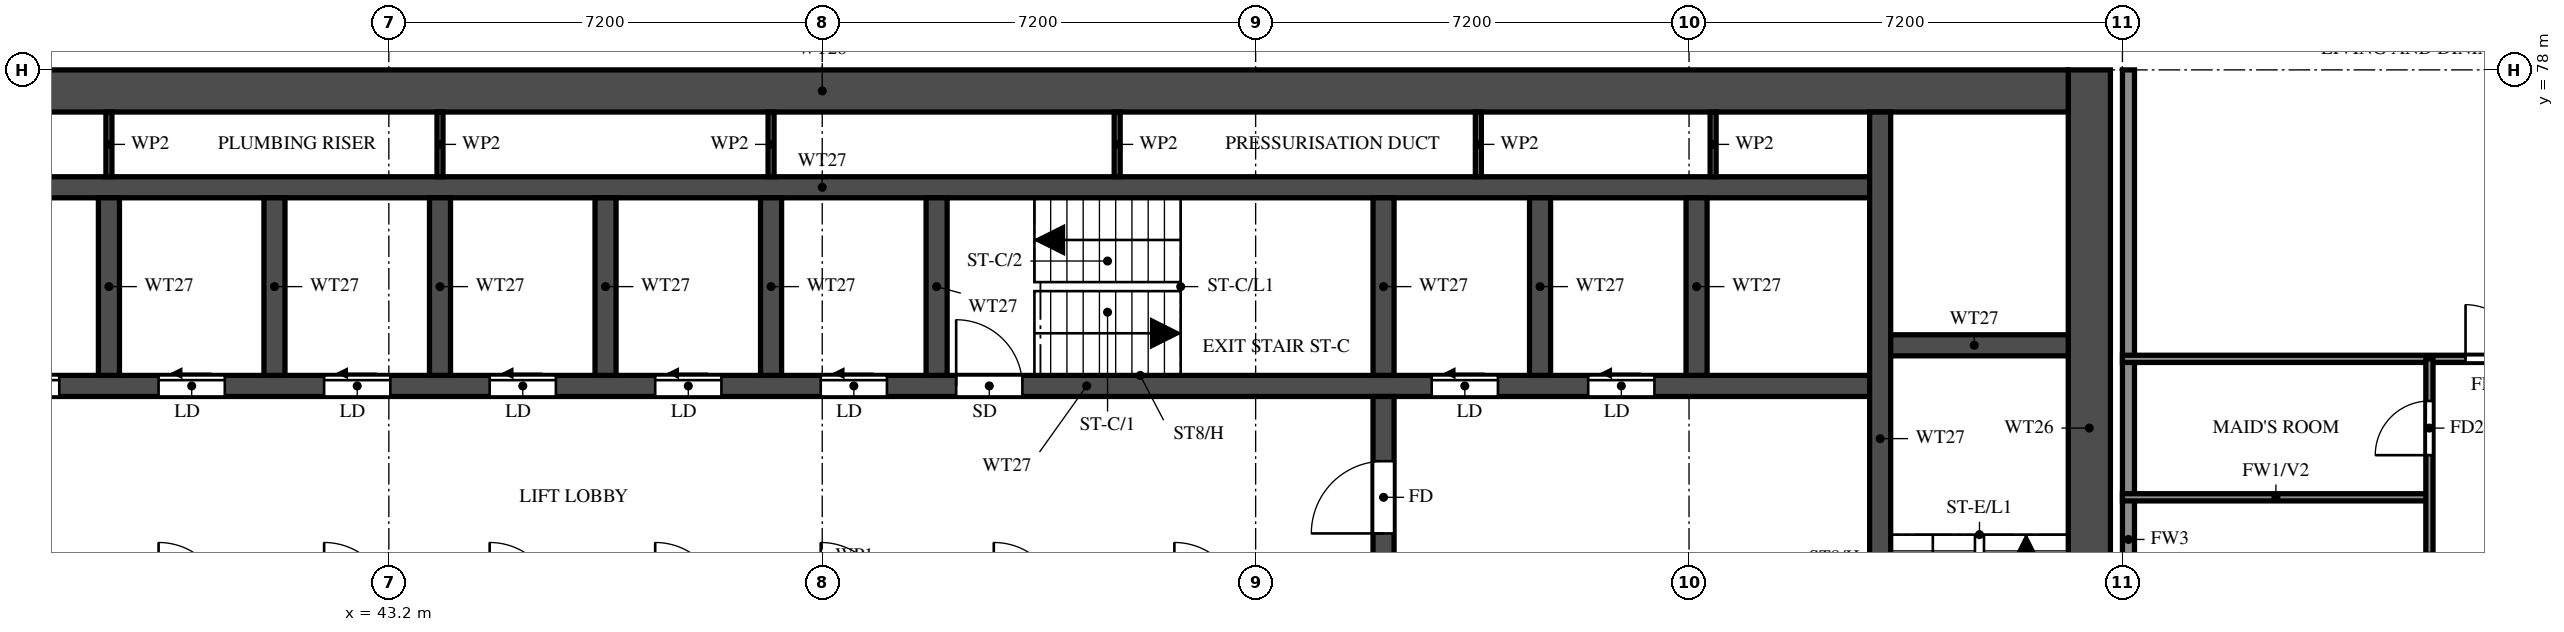
"""IFC4 building model, lengths in metres.
Left out: names, types, materials, properties, quantities, classifications, styles, units other than length and angle.
Written with IfcOpenShell. Run it as: python <this file> out.ifc"""

import sys

from ifc_helpers import new_model, si_unit, direction, frame, frame_2d, origin, place, context, subcontext, project, spatial, rectangle, extrude, element, fill, save


model = new_model("IFC4")
c1 = context("Model", 3, precision=1e-05, world=origin(), true_north=direction((0.0, 1.0)))
c2 = subcontext(c1, "Body", "Model", "MODEL_VIEW")
j1 = project(units=[si_unit("LENGTHUNIT", "METRE"), si_unit("PLANEANGLEUNIT", "RADIAN")], contexts=[c1])
p1 = place(None, origin())
s1 = spatial("IfcSite", under=j1, at=p1, CompositionType="ELEMENT")
p2 = place(p1, origin())
s2 = spatial("IfcBuilding", under=s1, at=p2, CompositionType="ELEMENT")
p3 = place(p2, frame((0.0, 0.0, 146.5)))
s3 = spatial("IfcBuildingStorey", under=s2, at=p3, CompositionType="ELEMENT", Elevation=146.5)
p4 = place(p3, frame((71.45, 66.1, 0.0), z_axis=(0.0, 0.0, 1.0), x_axis=(0.0, 1.0, 0.0)))
e1 = element("IfcWall", 1, at=p4, inside=s3, PredefinedType="SHEAR", context=c2, shape_type="SweptSolid", body=[
    extrude(rectangle(XDim=11.9, YDim=0.7, at=frame_2d((5.95, 0.0))), origin(), (0.0, 0.0, 1.0), 3.2),
])
p5 = place(p3, frame((29.7, 77.65, 0.0), z_axis=(0.0, 0.0, 1.0), x_axis=(1.0, 0.0, 0.0)))
e2 = element("IfcWall", 2, at=p5, inside=s3, PredefinedType="SHEAR", context=c2, shape_type="SweptSolid", body=[
    extrude(rectangle(XDim=41.4, YDim=0.7, at=frame_2d((20.7, 0.0))), origin(), (0.0, 0.0, 1.0), 3.2),
])
p6 = place(p3, frame((32.825, 72.75, 0.0), z_axis=(0.0, 0.0, 1.0), x_axis=(1.0, 0.0, 0.0)))
e3 = element("IfcWall", 3, at=p6, inside=s3, PredefinedType="SHEAR", context=c2, shape_type="SweptSolid", body=[
    extrude(rectangle(XDim=35.15, YDim=0.35, at=frame_2d((17.575, 0.0))), origin(), (0.0, 0.0, 1.0), 3.2),
])
p7 = place(p6, frame((19.8, 0.0, 0.0)))
e4 = element("IfcOpeningElement", 4, at=p7, cuts=e3, PredefinedType="OPENING", context=c2, shape_type="SweptSolid", body=[
    extrude(rectangle(XDim=1.1, YDim=2.1, at=frame_2d((0.55, 1.05))), frame((0.0, 0.185, 0.0), z_axis=(0.0, -1.0, 0.0), x_axis=(1.0, 0.0, 0.0)), (0.0, 0.0, 1.0), 0.37),
])
p8 = place(p6, frame((27.7, 0.0, 0.0)))
e5 = element("IfcOpeningElement", 5, at=p8, cuts=e3, PredefinedType="OPENING", context=c2, shape_type="SweptSolid", body=[
    extrude(rectangle(XDim=1.1, YDim=2.1, at=frame_2d((0.55, 1.05))), frame((0.0, 0.185, 0.0), z_axis=(0.0, -1.0, 0.0), x_axis=(1.0, 0.0, 0.0)), (0.0, 0.0, 1.0), 0.37),
])
p9 = place(p6, frame((30.3, 0.0, 0.0)))
e6 = element("IfcOpeningElement", 6, at=p9, cuts=e3, PredefinedType="OPENING", context=c2, shape_type="SweptSolid", body=[
    extrude(rectangle(XDim=1.1, YDim=2.1, at=frame_2d((0.55, 1.05))), frame((0.0, 0.185, 0.0), z_axis=(0.0, -1.0, 0.0), x_axis=(1.0, 0.0, 0.0)), (0.0, 0.0, 1.0), 0.37),
])
p10 = place(p6, frame((3.8, 0.0, 0.0)))
e7 = element("IfcOpeningElement", 7, at=p10, cuts=e3, PredefinedType="OPENING", context=c2, shape_type="SweptSolid", body=[
    extrude(rectangle(XDim=1.1, YDim=2.1, at=frame_2d((0.55, 1.05))), frame((0.0, 0.185, 0.0), z_axis=(0.0, -1.0, 0.0), x_axis=(1.0, 0.0, 0.0)), (0.0, 0.0, 1.0), 0.37),
])
p11 = place(p6, frame((6.55, 0.0, 0.0)))
e8 = element("IfcOpeningElement", 8, at=p11, cuts=e3, PredefinedType="OPENING", context=c2, shape_type="SweptSolid", body=[
    extrude(rectangle(XDim=1.1, YDim=2.1, at=frame_2d((0.55, 1.05))), frame((0.0, 0.185, 0.0), z_axis=(0.0, -1.0, 0.0), x_axis=(1.0, 0.0, 0.0)), (0.0, 0.0, 1.0), 0.37),
])
p12 = place(p6, frame((9.3, 0.0, 0.0)))
e9 = element("IfcOpeningElement", 9, at=p12, cuts=e3, PredefinedType="OPENING", context=c2, shape_type="SweptSolid", body=[
    extrude(rectangle(XDim=1.1, YDim=2.1, at=frame_2d((0.55, 1.05))), frame((0.0, 0.185, 0.0), z_axis=(0.0, -1.0, 0.0), x_axis=(1.0, 0.0, 0.0)), (0.0, 0.0, 1.0), 0.37),
])
p13 = place(p6, frame((12.05, 0.0, 0.0)))
e10 = element("IfcOpeningElement", 10, at=p13, cuts=e3, PredefinedType="OPENING", context=c2, shape_type="SweptSolid", body=[
    extrude(rectangle(XDim=1.1, YDim=2.1, at=frame_2d((0.55, 1.05))), frame((0.0, 0.185, 0.0), z_axis=(0.0, -1.0, 0.0), x_axis=(1.0, 0.0, 0.0)), (0.0, 0.0, 1.0), 0.37),
])
p14 = place(p6, frame((14.8, 0.0, 0.0)))
e11 = element("IfcOpeningElement", 11, at=p14, cuts=e3, PredefinedType="OPENING", context=c2, shape_type="SweptSolid", body=[
    extrude(rectangle(XDim=1.1, YDim=2.1, at=frame_2d((0.55, 1.05))), frame((0.0, 0.185, 0.0), z_axis=(0.0, -1.0, 0.0), x_axis=(1.0, 0.0, 0.0)), (0.0, 0.0, 1.0), 0.37),
])
p15 = place(p6, frame((17.55, 0.0, 0.0)))
e12 = element("IfcOpeningElement", 12, at=p15, cuts=e3, PredefinedType="OPENING", context=c2, shape_type="SweptSolid", body=[
    extrude(rectangle(XDim=1.1, YDim=2.1, at=frame_2d((0.55, 1.05))), frame((0.0, 0.185, 0.0), z_axis=(0.0, -1.0, 0.0), x_axis=(1.0, 0.0, 0.0)), (0.0, 0.0, 1.0), 0.37),
])
p16 = place(p6, frame((0.938, 0.0, 0.0)))
e13 = element("IfcOpeningElement", 13, at=p16, cuts=e3, PredefinedType="OPENING", context=c2, shape_type="SweptSolid", body=[
    extrude(rectangle(XDim=1.1, YDim=2.1, at=frame_2d((0.55, 1.05))), frame((0.0, 0.185, 0.0), z_axis=(0.0, -1.0, 0.0), x_axis=(1.0, 0.0, 0.0)), (0.0, 0.0, 1.0), 0.37),
])
p17 = place(p3, frame((32.825, 76.05, 0.0), z_axis=(0.0, 0.0, 1.0), x_axis=(1.0, 0.0, 0.0)))
e14 = element("IfcWall", 14, at=p17, inside=s3, PredefinedType="SHEAR", context=c2, shape_type="SweptSolid", body=[
    extrude(rectangle(XDim=35.15, YDim=0.35, at=frame_2d((17.575, 0.0))), origin(), (0.0, 0.0, 1.0), 3.2),
])
p18 = place(p3, frame((67.975, 73.425, 0.0), z_axis=(0.0, 0.0, 1.0), x_axis=(1.0, 0.0, 0.0)))
e15 = element("IfcWall", 15, at=p18, inside=s3, PredefinedType="SHEAR", context=c2, shape_type="SweptSolid", body=[
    extrude(rectangle(XDim=3.125, YDim=0.35, at=frame_2d((1.562, 0.0))), origin(), (0.0, 0.0, 1.0), 3.2),
])
p19 = place(p3, frame((67.975, 66.45, 0.0), z_axis=(0.0, 0.0, 1.0), x_axis=(0.0, 1.0, 0.0)))
e16 = element("IfcWall", 16, at=p19, inside=s3, PredefinedType="SHEAR", context=c2, shape_type="SweptSolid", body=[
    extrude(rectangle(XDim=10.85, YDim=0.35, at=frame_2d((5.425, 0.0))), origin(), (0.0, 0.0, 1.0), 3.2),
])
p20 = place(p19, frame((0.15, 0.0, 0.0)))
e17 = element("IfcOpeningElement", 17, at=p20, cuts=e16, PredefinedType="OPENING", context=c2, shape_type="SweptSolid", body=[
    extrude(rectangle(XDim=1.1, YDim=2.1, at=frame_2d((0.55, 1.05))), frame((0.0, 0.185, 0.0), z_axis=(0.0, -1.0, 0.0), x_axis=(1.0, 0.0, 0.0)), (0.0, 0.0, 1.0), 0.37),
])
p21 = place(p3, frame((59.725, 66.45, 0.0), z_axis=(0.0, 0.0, 1.0), x_axis=(0.0, 1.0, 0.0)))
e18 = element("IfcWall", 18, at=p21, inside=s3, PredefinedType="SHEAR", context=c2, shape_type="SweptSolid", body=[
    extrude(rectangle(XDim=6.125, YDim=0.35, at=frame_2d((3.062, 0.0))), origin(), (0.0, 0.0, 1.0), 3.2),
])
p22 = place(p21, frame((3.85, 0.0, 0.0)))
e19 = element("IfcOpeningElement", 19, at=p22, cuts=e18, PredefinedType="OPENING", context=c2, shape_type="SweptSolid", body=[
    extrude(rectangle(XDim=1.2, YDim=2.1, at=frame_2d((0.6, 1.05))), frame((0.0, 0.185, 0.0), z_axis=(0.0, -1.0, 0.0), x_axis=(1.0, 0.0, 0.0)), (0.0, 0.0, 1.0), 0.37),
])
for number, where, z_axis, x_axis in (
    (20, (59.725, 72.925, 0.0), (0.0, 0.0, 1.0), (0.0, 1.0, 0.0)),
    (21, (38.55, 72.925, 0.0), (0.0, 0.0, 1.0), (0.0, 1.0, 0.0)),
    (22, (41.3, 72.925, 0.0), (0.0, 0.0, 1.0), (0.0, 1.0, 0.0)),
    (23, (44.05, 72.925, 0.0), (0.0, 0.0, 1.0), (0.0, 1.0, 0.0)),
    (24, (46.8, 72.925, 0.0), (0.0, 0.0, 1.0), (0.0, 1.0, 0.0)),
    (25, (49.55, 72.925, 0.0), (0.0, 0.0, 1.0), (0.0, 1.0, 0.0)),
    (26, (52.3, 72.925, 0.0), (0.0, 0.0, 1.0), (0.0, 1.0, 0.0)),
    (27, (62.325, 72.925, 0.0), (0.0, 0.0, 1.0), (0.0, 1.0, 0.0)),
    (28, (64.925, 72.925, 0.0), (0.0, 0.0, 1.0), (0.0, 1.0, 0.0)),
):
    element("IfcWall", number, at=place(p3, frame(where, z_axis=z_axis, x_axis=x_axis)), inside=s3, PredefinedType="SHEAR", context=c2, shape_type="SweptSolid", body=[
        extrude(rectangle(XDim=2.95, YDim=0.35, at=frame_2d((1.475, 0.0))), origin(), (0.0, 0.0, 1.0), 3.2),
    ])
for number, where, z_axis, x_axis in (
    (29, (38.55, 76.225, 0.0), (0.0, 0.0, 1.0), (0.0, 1.0, 0.0)),
    (30, (44.05, 76.225, 0.0), (0.0, 0.0, 1.0), (0.0, 1.0, 0.0)),
    (31, (49.55, 76.225, 0.0), (0.0, 0.0, 1.0), (0.0, 1.0, 0.0)),
    (32, (55.3, 76.225, 0.0), (0.0, 0.0, 1.0), (0.0, 1.0, 0.0)),
    (33, (61.3, 76.225, 0.0), (0.0, 0.0, 1.0), (0.0, 1.0, 0.0)),
    (34, (65.2, 76.225, 0.0), (0.0, 0.0, 1.0), (0.0, 1.0, 0.0)),
):
    element("IfcWall", number, at=place(p3, frame(where, z_axis=z_axis, x_axis=x_axis)), inside=s3, PredefinedType="PARTITIONING", context=c2, shape_type="SweptSolid", body=[
        extrude(rectangle(XDim=1.075, YDim=0.1, at=frame_2d((0.538, 0.0))), origin(), (0.0, 0.0, 1.0), 3.2),
    ])
p23 = place(p3, frame((72.1, 62.4, 0.0), z_axis=(0.0, 0.0, 1.0), x_axis=(0.0, 1.0, 0.0)))
e35 = element("IfcWall", 35, at=p23, inside=s3, PredefinedType="SOLIDWALL", context=c2, shape_type="SweptSolid", body=[
    extrude(rectangle(XDim=15.6, YDim=0.2, at=frame_2d((7.8, 0.0))), origin(), (0.0, 0.0, 1.0), 3.2),
])
p24 = place(p3, frame((72.0, 70.9, 0.0), z_axis=(0.0, 0.0, 1.0), x_axis=(1.0, 0.0, 0.0)))
e36 = element("IfcWall", 36, at=p24, inside=s3, PredefinedType="PARTITIONING", context=c2, shape_type="SweptSolid", body=[
    extrude(rectangle(XDim=5.1, YDim=0.12, at=frame_2d((2.55, 0.0))), origin(), (0.0, 0.0, 1.0), 3.2),
])
p25 = place(p3, frame((72.0, 73.2, 0.0), z_axis=(0.0, 0.0, 1.0), x_axis=(1.0, 0.0, 0.0)))
e37 = element("IfcWall", 37, at=p25, inside=s3, PredefinedType="PARTITIONING", context=c2, shape_type="SweptSolid", body=[
    extrude(rectangle(XDim=14.275, YDim=0.12, at=frame_2d((7.137, 0.0))), origin(), (0.0, 0.0, 1.0), 2.3),
])
p26 = place(p25, frame((5.7, 0.0, 0.0)))
e38 = element("IfcOpeningElement", 38, at=p26, cuts=e37, PredefinedType="OPENING", context=c2, shape_type="SweptSolid", body=[
    extrude(rectangle(XDim=0.9, YDim=2.1, at=frame_2d((0.45, 1.05))), frame((0.0, 0.07, 0.0), z_axis=(0.0, -1.0, 0.0), x_axis=(1.0, 0.0, 0.0)), (0.0, 0.0, 1.0), 0.14),
])
p27 = place(p3, frame((77.1, 61.2, 0.0), z_axis=(0.0, 0.0, 1.0), x_axis=(0.0, 1.0, 0.0)))
e39 = element("IfcWall", 39, at=p27, inside=s3, PredefinedType="PARTITIONING", context=c2, shape_type="SweptSolid", body=[
    extrude(rectangle(XDim=12.0, YDim=0.12, at=frame_2d((6.0, 0.0))), origin(), (0.0, 0.0, 1.0), 3.2),
])
p28 = place(p27, frame((5.45, 0.0, 0.0)))
e40 = element("IfcOpeningElement", 40, at=p28, cuts=e39, PredefinedType="OPENING", context=c2, shape_type="SweptSolid", body=[
    extrude(rectangle(XDim=0.8, YDim=2.1, at=frame_2d((0.4, 1.05))), frame((0.0, 0.07, 0.0), z_axis=(0.0, -1.0, 0.0), x_axis=(1.0, 0.0, 0.0)), (0.0, 0.0, 1.0), 0.14),
])
p29 = place(p27, frame((7.975, 0.0, 0.0)))
e41 = element("IfcOpeningElement", 41, at=p29, cuts=e39, PredefinedType="OPENING", context=c2, shape_type="SweptSolid", body=[
    extrude(rectangle(XDim=0.8, YDim=2.1, at=frame_2d((0.4, 1.05))), frame((0.0, 0.07, 0.0), z_axis=(0.0, -1.0, 0.0), x_axis=(1.0, 0.0, 0.0)), (0.0, 0.0, 1.0), 0.14),
])
p30 = place(p27, frame((10.4, 0.0, 0.0)))
e42 = element("IfcOpeningElement", 42, at=p30, cuts=e39, PredefinedType="OPENING", context=c2, shape_type="SweptSolid", body=[
    extrude(rectangle(XDim=0.9, YDim=2.1, at=frame_2d((0.45, 1.05))), frame((0.0, 0.07, 0.0), z_axis=(0.0, -1.0, 0.0), x_axis=(1.0, 0.0, 0.0)), (0.0, 0.0, 1.0), 0.14),
])
p31 = place(p7, origin())
e43 = element("IfcDoor", 43, at=p31, inside=s3, OperationType="SINGLE_SWING_LEFT", PredefinedType="DOOR", context=c2, shape_type="SweptSolid", body=[
    extrude(rectangle(XDim=1.1, YDim=2.1, at=frame_2d((0.55, 1.05))), frame((0.0, 0.025, 0.0), z_axis=(0.0, -1.0, 0.0), x_axis=(1.0, 0.0, 0.0)), (0.0, 0.0, 1.0), 0.05),
])
fill(e4, e43)
p32 = place(p22, origin())
e44 = element("IfcDoor", 44, at=p32, inside=s3, OperationType="SINGLE_SWING_LEFT", PredefinedType="DOOR", context=c2, shape_type="SweptSolid", body=[
    extrude(rectangle(XDim=1.2, YDim=2.1, at=frame_2d((0.6, 1.05))), frame((0.0, 0.025, 0.0), z_axis=(0.0, -1.0, 0.0), x_axis=(1.0, 0.0, 0.0)), (0.0, 0.0, 1.0), 0.05),
])
fill(e19, e44)
p33 = place(p8, origin())
e45 = element("IfcDoor", 45, at=p33, inside=s3, OperationType="SLIDING_TO_LEFT", PredefinedType="DOOR", context=c2, shape_type="SweptSolid", body=[
    extrude(rectangle(XDim=1.1, YDim=2.1, at=frame_2d((0.55, 1.05))), frame((0.0, 0.025, 0.0), z_axis=(0.0, -1.0, 0.0), x_axis=(1.0, 0.0, 0.0)), (0.0, 0.0, 1.0), 0.05),
])
fill(e5, e45)
p34 = place(p9, origin())
e46 = element("IfcDoor", 46, at=p34, inside=s3, OperationType="SLIDING_TO_LEFT", PredefinedType="DOOR", context=c2, shape_type="SweptSolid", body=[
    extrude(rectangle(XDim=1.1, YDim=2.1, at=frame_2d((0.55, 1.05))), frame((0.0, 0.025, 0.0), z_axis=(0.0, -1.0, 0.0), x_axis=(1.0, 0.0, 0.0)), (0.0, 0.0, 1.0), 0.05),
])
fill(e6, e46)
p35 = place(p10, origin())
e47 = element("IfcDoor", 47, at=p35, inside=s3, OperationType="SLIDING_TO_LEFT", PredefinedType="DOOR", context=c2, shape_type="SweptSolid", body=[
    extrude(rectangle(XDim=1.1, YDim=2.1, at=frame_2d((0.55, 1.05))), frame((0.0, 0.025, 0.0), z_axis=(0.0, -1.0, 0.0), x_axis=(1.0, 0.0, 0.0)), (0.0, 0.0, 1.0), 0.05),
])
fill(e7, e47)
p36 = place(p11, origin())
e48 = element("IfcDoor", 48, at=p36, inside=s3, OperationType="SLIDING_TO_LEFT", PredefinedType="DOOR", context=c2, shape_type="SweptSolid", body=[
    extrude(rectangle(XDim=1.1, YDim=2.1, at=frame_2d((0.55, 1.05))), frame((0.0, 0.025, 0.0), z_axis=(0.0, -1.0, 0.0), x_axis=(1.0, 0.0, 0.0)), (0.0, 0.0, 1.0), 0.05),
])
fill(e8, e48)
p37 = place(p12, origin())
e49 = element("IfcDoor", 49, at=p37, inside=s3, OperationType="SLIDING_TO_LEFT", PredefinedType="DOOR", context=c2, shape_type="SweptSolid", body=[
    extrude(rectangle(XDim=1.1, YDim=2.1, at=frame_2d((0.55, 1.05))), frame((0.0, 0.025, 0.0), z_axis=(0.0, -1.0, 0.0), x_axis=(1.0, 0.0, 0.0)), (0.0, 0.0, 1.0), 0.05),
])
fill(e9, e49)
p38 = place(p13, origin())
e50 = element("IfcDoor", 50, at=p38, inside=s3, OperationType="SLIDING_TO_LEFT", PredefinedType="DOOR", context=c2, shape_type="SweptSolid", body=[
    extrude(rectangle(XDim=1.1, YDim=2.1, at=frame_2d((0.55, 1.05))), frame((0.0, 0.025, 0.0), z_axis=(0.0, -1.0, 0.0), x_axis=(1.0, 0.0, 0.0)), (0.0, 0.0, 1.0), 0.05),
])
fill(e10, e50)
p39 = place(p14, origin())
e51 = element("IfcDoor", 51, at=p39, inside=s3, OperationType="SLIDING_TO_LEFT", PredefinedType="DOOR", context=c2, shape_type="SweptSolid", body=[
    extrude(rectangle(XDim=1.1, YDim=2.1, at=frame_2d((0.55, 1.05))), frame((0.0, 0.025, 0.0), z_axis=(0.0, -1.0, 0.0), x_axis=(1.0, 0.0, 0.0)), (0.0, 0.0, 1.0), 0.05),
])
fill(e11, e51)
p40 = place(p15, origin())
e52 = element("IfcDoor", 52, at=p40, inside=s3, OperationType="SLIDING_TO_LEFT", PredefinedType="DOOR", context=c2, shape_type="SweptSolid", body=[
    extrude(rectangle(XDim=1.1, YDim=2.1, at=frame_2d((0.55, 1.05))), frame((0.0, 0.025, 0.0), z_axis=(0.0, -1.0, 0.0), x_axis=(1.0, 0.0, 0.0)), (0.0, 0.0, 1.0), 0.05),
])
fill(e12, e52)
p41 = place(p26, origin())
e53 = element("IfcDoor", 53, at=p41, inside=s3, OperationType="SINGLE_SWING_LEFT", PredefinedType="DOOR", context=c2, shape_type="SweptSolid", body=[
    extrude(rectangle(XDim=0.9, YDim=2.1, at=frame_2d((0.45, 1.05))), frame((0.0, 0.025, 0.0), z_axis=(0.0, -1.0, 0.0), x_axis=(1.0, 0.0, 0.0)), (0.0, 0.0, 1.0), 0.05),
])
fill(e38, e53)
p42 = place(p30, origin())
e54 = element("IfcDoor", 54, at=p42, inside=s3, OperationType="SINGLE_SWING_LEFT", PredefinedType="DOOR", context=c2, shape_type="SweptSolid", body=[
    extrude(rectangle(XDim=0.9, YDim=2.1, at=frame_2d((0.45, 1.05))), frame((0.0, 0.025, 0.0), z_axis=(0.0, -1.0, 0.0), x_axis=(1.0, 0.0, 0.0)), (0.0, 0.0, 1.0), 0.05),
])
fill(e42, e54)
save(model, sys.argv[1])
